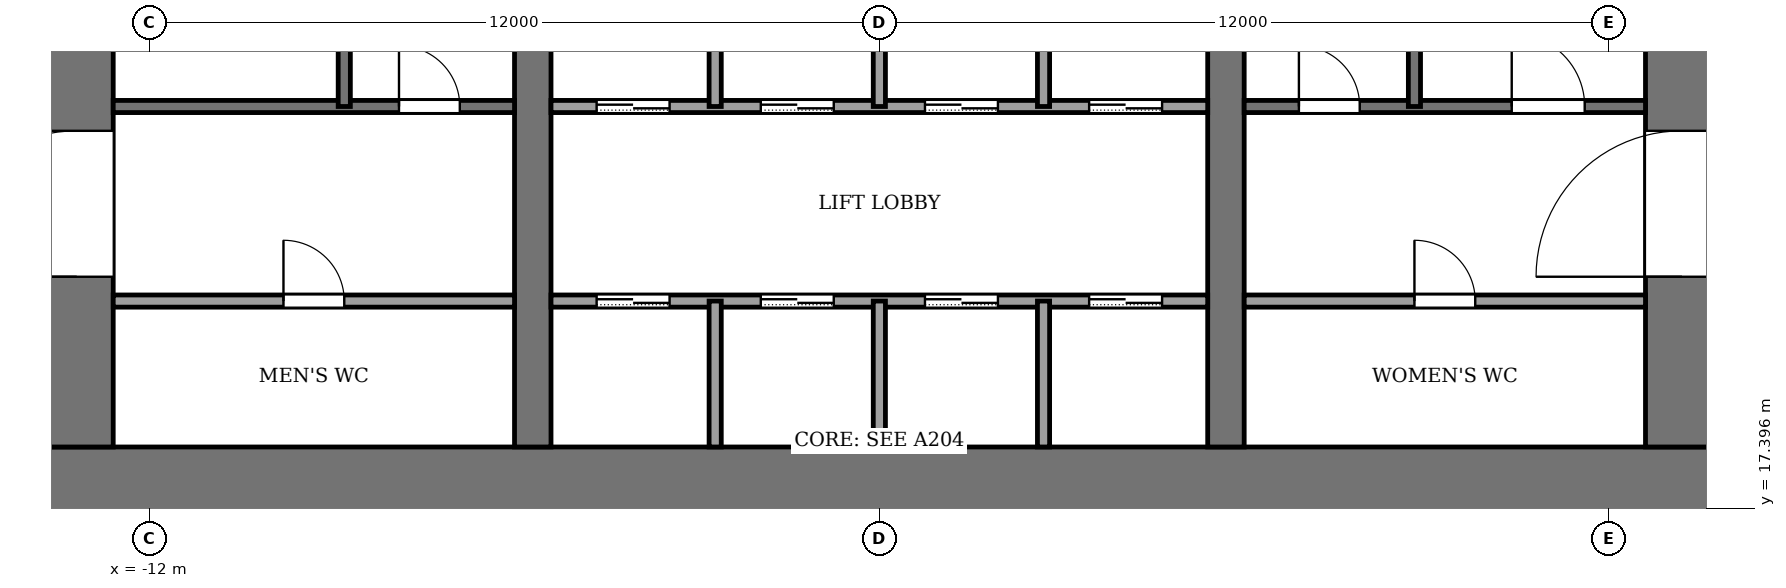
"""IFC4 building model, lengths in metres.
Left out: names, types, materials, properties, quantities, classifications, styles, units other than length and angle.
Written with IfcOpenShell. Run it as: python <this file> out.ifc"""

import sys

from ifc_helpers import new_model, si_unit, direction, frame, frame_2d, origin, place, context, subcontext, project, spatial, rectangle, extrude, element, fill, save


model = new_model("IFC4")
c1 = context("Model", 3, precision=1e-05, world=origin(), true_north=direction((0.0, 1.0)))
c2 = subcontext(c1, "Body", "Model", "MODEL_VIEW")
j1 = project(units=[si_unit("LENGTHUNIT", "METRE"), si_unit("PLANEANGLEUNIT", "RADIAN")], contexts=[c1])
p1 = place(None, origin())
s1 = spatial("IfcSite", under=j1, at=p1, CompositionType="ELEMENT")
p2 = place(p1, origin())
s2 = spatial("IfcBuilding", under=s1, at=p2, CompositionType="ELEMENT")
p3 = place(p2, frame((0.0, 0.0, 86.0)))
s3 = spatial("IfcBuildingStorey", under=s2, at=p3, CompositionType="ELEMENT", Elevation=86.0)
p4 = place(p3, frame((-13.8, 17.8, -0.13), z_axis=(0.0, 0.0, 1.0), x_axis=(1.0, 0.0, 0.0)))
e1 = element("IfcWall", 1, at=p4, inside=s3, PredefinedType="SHEAR", context=c2, shape_type="SweptSolid", body=[
    extrude(rectangle(XDim=27.6, YDim=1.2, at=frame_2d((13.8, 0.0))), origin(), (0.0, 0.0, 1.0), 4.0),
])
p5 = place(p3, frame((-13.2, 18.4, -0.13), z_axis=(0.0, 0.0, 1.0), x_axis=(0.0, 1.0, 0.0)))
e2 = element("IfcWall", 2, at=p5, inside=s3, PredefinedType="SHEAR", context=c2, shape_type="SweptSolid", body=[
    extrude(rectangle(XDim=19.2, YDim=1.2, at=frame_2d((9.6, 0.0))), origin(), (0.0, 0.0, 1.0), 4.0),
])
p6 = place(p5, frame((2.8, 0.0, 0.13)))
e3 = element("IfcOpeningElement", 3, at=p6, cuts=e2, PredefinedType="OPENING", context=c2, shape_type="SweptSolid", body=[
    extrude(rectangle(XDim=2.4, YDim=2.4, at=frame_2d((1.2, 1.2))), frame((0.0, 0.61, 0.0), z_axis=(0.0, -1.0, 0.0), x_axis=(1.0, 0.0, 0.0)), (0.0, 0.0, 1.0), 1.22),
])
p7 = place(p5, frame((13.4, 0.0, 0.13)))
e4 = element("IfcOpeningElement", 4, at=p7, cuts=e2, PredefinedType="OPENING", context=c2, shape_type="SweptSolid", body=[
    extrude(rectangle(XDim=1.4, YDim=2.2, at=frame_2d((0.7, 1.1))), frame((0.0, 0.61, 0.0), z_axis=(0.0, -1.0, 0.0), x_axis=(1.0, 0.0, 0.0)), (0.0, 0.0, 1.0), 1.22),
])
p8 = place(p3, frame((13.2, 18.4, -0.13), z_axis=(0.0, 0.0, 1.0), x_axis=(0.0, 1.0, 0.0)))
e5 = element("IfcWall", 5, at=p8, inside=s3, PredefinedType="SHEAR", context=c2, shape_type="SweptSolid", body=[
    extrude(rectangle(XDim=19.2, YDim=1.2, at=frame_2d((9.6, 0.0))), origin(), (0.0, 0.0, 1.0), 4.0),
])
p9 = place(p8, frame((2.8, 0.0, 0.13)))
e6 = element("IfcOpeningElement", 6, at=p9, cuts=e5, PredefinedType="OPENING", context=c2, shape_type="SweptSolid", body=[
    extrude(rectangle(XDim=2.4, YDim=2.4, at=frame_2d((1.2, 1.2))), frame((0.0, 0.61, 0.0), z_axis=(0.0, -1.0, 0.0), x_axis=(1.0, 0.0, 0.0)), (0.0, 0.0, 1.0), 1.22),
])
p10 = place(p8, frame((13.3, 0.0, 0.13)))
e7 = element("IfcOpeningElement", 7, at=p10, cuts=e5, PredefinedType="OPENING", context=c2, shape_type="SweptSolid", body=[
    extrude(rectangle(XDim=2.4, YDim=2.4, at=frame_2d((1.2, 1.2))), frame((0.0, 0.61, 0.0), z_axis=(0.0, -1.0, 0.0), x_axis=(1.0, 0.0, 0.0)), (0.0, 0.0, 1.0), 1.22),
])
p11 = place(p3, frame((-5.7, 18.4, -0.13), z_axis=(0.0, 0.0, 1.0), x_axis=(0.0, 1.0, 0.0)))
e8 = element("IfcWall", 8, at=p11, inside=s3, PredefinedType="SHEAR", context=c2, shape_type="SweptSolid", body=[
    extrude(rectangle(XDim=19.2, YDim=0.6, at=frame_2d((9.6, 0.0))), origin(), (0.0, 0.0, 1.0), 4.0),
])
p12 = place(p11, frame((8.35, 0.0, 0.13)))
e9 = element("IfcOpeningElement", 9, at=p12, cuts=e8, PredefinedType="OPENING", context=c2, shape_type="SweptSolid", body=[
    extrude(rectangle(XDim=0.9, YDim=2.1, at=frame_2d((0.45, 1.05))), frame((0.0, 0.31, 0.0), z_axis=(0.0, -1.0, 0.0), x_axis=(1.0, 0.0, 0.0)), (0.0, 0.0, 1.0), 0.62),
])
p13 = place(p3, frame((5.7, 18.4, -0.13), z_axis=(0.0, 0.0, 1.0), x_axis=(0.0, 1.0, 0.0)))
e10 = element("IfcWall", 10, at=p13, inside=s3, PredefinedType="SHEAR", context=c2, shape_type="SweptSolid", body=[
    extrude(rectangle(XDim=19.2, YDim=0.6, at=frame_2d((9.6, 0.0))), origin(), (0.0, 0.0, 1.0), 4.0),
])
p14 = place(p13, frame((13.3, 0.0, 0.13)))
e11 = element("IfcOpeningElement", 11, at=p14, cuts=e10, PredefinedType="OPENING", context=c2, shape_type="SweptSolid", body=[
    extrude(rectangle(XDim=2.4, YDim=2.4, at=frame_2d((1.2, 1.2))), frame((0.0, 0.31, 0.0), z_axis=(0.0, -1.0, 0.0), x_axis=(1.0, 0.0, 0.0)), (0.0, 0.0, 1.0), 0.62),
])
p15 = place(p3, frame((-12.6, 20.8, 0.0), z_axis=(0.0, 0.0, 1.0), x_axis=(1.0, 0.0, 0.0)))
e12 = element("IfcWall", 12, at=p15, inside=s3, PredefinedType="PARTITIONING", context=c2, shape_type="SweptSolid", body=[
    extrude(rectangle(XDim=6.6, YDim=0.2, at=frame_2d((3.3, 0.0))), origin(), (0.0, 0.0, 1.0), 3.87),
])
p16 = place(p15, frame((2.8, 0.0, 0.0)))
e13 = element("IfcOpeningElement", 13, at=p16, cuts=e12, PredefinedType="OPENING", context=c2, shape_type="SweptSolid", body=[
    extrude(rectangle(XDim=1.0, YDim=2.1, at=frame_2d((0.5, 1.05))), frame((0.0, 0.11, 0.0), z_axis=(0.0, -1.0, 0.0), x_axis=(1.0, 0.0, 0.0)), (0.0, 0.0, 1.0), 0.22),
])
p17 = place(p3, frame((-5.4, 20.8, 0.0), z_axis=(0.0, 0.0, 1.0), x_axis=(1.0, 0.0, 0.0)))
e14 = element("IfcWall", 14, at=p17, inside=s3, PredefinedType="PARTITIONING", context=c2, shape_type="SweptSolid", body=[
    extrude(rectangle(XDim=10.8, YDim=0.2, at=frame_2d((5.4, 0.0))), origin(), (0.0, 0.0, 1.0), 3.87),
])
p18 = place(p17, frame((0.75, 0.0, 0.0)))
e15 = element("IfcOpeningElement", 15, at=p18, cuts=e14, PredefinedType="OPENING", context=c2, shape_type="SweptSolid", body=[
    extrude(rectangle(XDim=1.2, YDim=2.2, at=frame_2d((0.6, 1.1))), frame((0.0, 0.11, 0.0), z_axis=(0.0, -1.0, 0.0), x_axis=(1.0, 0.0, 0.0)), (0.0, 0.0, 1.0), 0.22),
])
p19 = place(p17, frame((3.45, 0.0, 0.0)))
e16 = element("IfcOpeningElement", 16, at=p19, cuts=e14, PredefinedType="OPENING", context=c2, shape_type="SweptSolid", body=[
    extrude(rectangle(XDim=1.2, YDim=2.2, at=frame_2d((0.6, 1.1))), frame((0.0, 0.11, 0.0), z_axis=(0.0, -1.0, 0.0), x_axis=(1.0, 0.0, 0.0)), (0.0, 0.0, 1.0), 0.22),
])
p20 = place(p17, frame((6.15, 0.0, 0.0)))
e17 = element("IfcOpeningElement", 17, at=p20, cuts=e14, PredefinedType="OPENING", context=c2, shape_type="SweptSolid", body=[
    extrude(rectangle(XDim=1.2, YDim=2.2, at=frame_2d((0.6, 1.1))), frame((0.0, 0.11, 0.0), z_axis=(0.0, -1.0, 0.0), x_axis=(1.0, 0.0, 0.0)), (0.0, 0.0, 1.0), 0.22),
])
p21 = place(p17, frame((8.85, 0.0, 0.0)))
e18 = element("IfcOpeningElement", 18, at=p21, cuts=e14, PredefinedType="OPENING", context=c2, shape_type="SweptSolid", body=[
    extrude(rectangle(XDim=1.2, YDim=2.2, at=frame_2d((0.6, 1.1))), frame((0.0, 0.11, 0.0), z_axis=(0.0, -1.0, 0.0), x_axis=(1.0, 0.0, 0.0)), (0.0, 0.0, 1.0), 0.22),
])
p22 = place(p3, frame((6.0, 20.8, 0.0), z_axis=(0.0, 0.0, 1.0), x_axis=(1.0, 0.0, 0.0)))
e19 = element("IfcWall", 19, at=p22, inside=s3, PredefinedType="PARTITIONING", context=c2, shape_type="SweptSolid", body=[
    extrude(rectangle(XDim=6.6, YDim=0.2, at=frame_2d((3.3, 0.0))), origin(), (0.0, 0.0, 1.0), 3.87),
])
p23 = place(p22, frame((2.8, 0.0, 0.0)))
e20 = element("IfcOpeningElement", 20, at=p23, cuts=e19, PredefinedType="OPENING", context=c2, shape_type="SweptSolid", body=[
    extrude(rectangle(XDim=1.0, YDim=2.1, at=frame_2d((0.5, 1.05))), frame((0.0, 0.11, 0.0), z_axis=(0.0, -1.0, 0.0), x_axis=(1.0, 0.0, 0.0)), (0.0, 0.0, 1.0), 0.22),
])
p24 = place(p3, frame((-12.6, 24.0, 0.0), z_axis=(0.0, 0.0, 1.0), x_axis=(1.0, 0.0, 0.0)))
e21 = element("IfcWall", 21, at=p24, inside=s3, PredefinedType="PARTITIONING", context=c2, shape_type="SweptSolid", body=[
    extrude(rectangle(XDim=6.6, YDim=0.2, at=frame_2d((3.3, 0.0))), origin(), (0.0, 0.0, 1.0), 3.87),
])
p25 = place(p24, frame((4.7, 0.0, 0.0)))
e22 = element("IfcOpeningElement", 22, at=p25, cuts=e21, PredefinedType="OPENING", context=c2, shape_type="SweptSolid", body=[
    extrude(rectangle(XDim=1.0, YDim=2.1, at=frame_2d((0.5, 1.05))), frame((0.0, 0.11, 0.0), z_axis=(0.0, -1.0, 0.0), x_axis=(1.0, 0.0, 0.0)), (0.0, 0.0, 1.0), 0.22),
])
p26 = place(p3, frame((-5.4, 24.0, 0.0), z_axis=(0.0, 0.0, 1.0), x_axis=(1.0, 0.0, 0.0)))
e23 = element("IfcWall", 23, at=p26, inside=s3, PredefinedType="PARTITIONING", context=c2, shape_type="SweptSolid", body=[
    extrude(rectangle(XDim=10.8, YDim=0.2, at=frame_2d((5.4, 0.0))), origin(), (0.0, 0.0, 1.0), 3.87),
])
p27 = place(p26, frame((0.75, 0.0, 0.0)))
e24 = element("IfcOpeningElement", 24, at=p27, cuts=e23, PredefinedType="OPENING", context=c2, shape_type="SweptSolid", body=[
    extrude(rectangle(XDim=1.2, YDim=2.2, at=frame_2d((0.6, 1.1))), frame((0.0, 0.11, 0.0), z_axis=(0.0, -1.0, 0.0), x_axis=(1.0, 0.0, 0.0)), (0.0, 0.0, 1.0), 0.22),
])
p28 = place(p26, frame((3.45, 0.0, 0.0)))
e25 = element("IfcOpeningElement", 25, at=p28, cuts=e23, PredefinedType="OPENING", context=c2, shape_type="SweptSolid", body=[
    extrude(rectangle(XDim=1.2, YDim=2.2, at=frame_2d((0.6, 1.1))), frame((0.0, 0.11, 0.0), z_axis=(0.0, -1.0, 0.0), x_axis=(1.0, 0.0, 0.0)), (0.0, 0.0, 1.0), 0.22),
])
p29 = place(p26, frame((6.15, 0.0, 0.0)))
e26 = element("IfcOpeningElement", 26, at=p29, cuts=e23, PredefinedType="OPENING", context=c2, shape_type="SweptSolid", body=[
    extrude(rectangle(XDim=1.2, YDim=2.2, at=frame_2d((0.6, 1.1))), frame((0.0, 0.11, 0.0), z_axis=(0.0, -1.0, 0.0), x_axis=(1.0, 0.0, 0.0)), (0.0, 0.0, 1.0), 0.22),
])
p30 = place(p26, frame((8.85, 0.0, 0.0)))
e27 = element("IfcOpeningElement", 27, at=p30, cuts=e23, PredefinedType="OPENING", context=c2, shape_type="SweptSolid", body=[
    extrude(rectangle(XDim=1.2, YDim=2.2, at=frame_2d((0.6, 1.1))), frame((0.0, 0.11, 0.0), z_axis=(0.0, -1.0, 0.0), x_axis=(1.0, 0.0, 0.0)), (0.0, 0.0, 1.0), 0.22),
])
p31 = place(p3, frame((6.0, 24.0, 0.0), z_axis=(0.0, 0.0, 1.0), x_axis=(1.0, 0.0, 0.0)))
e28 = element("IfcWall", 28, at=p31, inside=s3, PredefinedType="PARTITIONING", context=c2, shape_type="SweptSolid", body=[
    extrude(rectangle(XDim=6.6, YDim=0.2, at=frame_2d((3.3, 0.0))), origin(), (0.0, 0.0, 1.0), 3.87),
])
p32 = place(p31, frame((0.9, 0.0, 0.0)))
e29 = element("IfcOpeningElement", 29, at=p32, cuts=e28, PredefinedType="OPENING", context=c2, shape_type="SweptSolid", body=[
    extrude(rectangle(XDim=1.0, YDim=2.1, at=frame_2d((0.5, 1.05))), frame((0.0, 0.11, 0.0), z_axis=(0.0, -1.0, 0.0), x_axis=(1.0, 0.0, 0.0)), (0.0, 0.0, 1.0), 0.22),
])
p33 = place(p31, frame((4.4, 0.0, 0.0)))
e30 = element("IfcOpeningElement", 30, at=p33, cuts=e28, PredefinedType="OPENING", context=c2, shape_type="SweptSolid", body=[
    extrude(rectangle(XDim=1.2, YDim=2.2, at=frame_2d((0.6, 1.1))), frame((0.0, 0.11, 0.0), z_axis=(0.0, -1.0, 0.0), x_axis=(1.0, 0.0, 0.0)), (0.0, 0.0, 1.0), 0.22),
])
p34 = place(p3, frame((-8.8, 24.0, 0.0), z_axis=(0.0, 0.0, 1.0), x_axis=(0.0, 1.0, 0.0)))
e31 = element("IfcWall", 31, at=p34, inside=s3, PredefinedType="PARTITIONING", context=c2, shape_type="SweptSolid", body=[
    extrude(rectangle(XDim=7.4, YDim=0.2, at=frame_2d((3.7, 0.0))), origin(), (0.0, 0.0, 1.0), 3.87),
])
p35 = place(p3, frame((-2.7, 18.4, 0.0), z_axis=(0.0, 0.0, 1.0), x_axis=(0.0, 1.0, 0.0)))
e32 = element("IfcWall", 32, at=p35, inside=s3, PredefinedType="PARTITIONING", context=c2, shape_type="SweptSolid", body=[
    extrude(rectangle(XDim=2.4, YDim=0.2, at=frame_2d((1.2, 0.0))), origin(), (0.0, 0.0, 1.0), 3.87),
])
p36 = place(p3, frame((-2.7, 24.0, 0.0), z_axis=(0.0, 0.0, 1.0), x_axis=(0.0, 1.0, 0.0)))
e33 = element("IfcWall", 33, at=p36, inside=s3, PredefinedType="PARTITIONING", context=c2, shape_type="SweptSolid", body=[
    extrude(rectangle(XDim=2.4, YDim=0.2, at=frame_2d((1.2, 0.0))), origin(), (0.0, 0.0, 1.0), 3.87),
])
p37 = place(p3, frame((0.0, 18.4, 0.0), z_axis=(0.0, 0.0, 1.0), x_axis=(0.0, 1.0, 0.0)))
e34 = element("IfcWall", 34, at=p37, inside=s3, PredefinedType="PARTITIONING", context=c2, shape_type="SweptSolid", body=[
    extrude(rectangle(XDim=2.4, YDim=0.2, at=frame_2d((1.2, 0.0))), origin(), (0.0, 0.0, 1.0), 3.87),
])
p38 = place(p3, frame((0.0, 24.0, 0.0), z_axis=(0.0, 0.0, 1.0), x_axis=(0.0, 1.0, 0.0)))
e35 = element("IfcWall", 35, at=p38, inside=s3, PredefinedType="PARTITIONING", context=c2, shape_type="SweptSolid", body=[
    extrude(rectangle(XDim=2.4, YDim=0.2, at=frame_2d((1.2, 0.0))), origin(), (0.0, 0.0, 1.0), 3.87),
])
p39 = place(p3, frame((2.7, 18.4, 0.0), z_axis=(0.0, 0.0, 1.0), x_axis=(0.0, 1.0, 0.0)))
e36 = element("IfcWall", 36, at=p39, inside=s3, PredefinedType="PARTITIONING", context=c2, shape_type="SweptSolid", body=[
    extrude(rectangle(XDim=2.4, YDim=0.2, at=frame_2d((1.2, 0.0))), origin(), (0.0, 0.0, 1.0), 3.87),
])
p40 = place(p3, frame((2.7, 24.0, 0.0), z_axis=(0.0, 0.0, 1.0), x_axis=(0.0, 1.0, 0.0)))
e37 = element("IfcWall", 37, at=p40, inside=s3, PredefinedType="PARTITIONING", context=c2, shape_type="SweptSolid", body=[
    extrude(rectangle(XDim=2.4, YDim=0.2, at=frame_2d((1.2, 0.0))), origin(), (0.0, 0.0, 1.0), 3.87),
])
p41 = place(p3, frame((8.8, 24.0, 0.0), z_axis=(0.0, 0.0, 1.0), x_axis=(0.0, 1.0, 0.0)))
e38 = element("IfcWall", 38, at=p41, inside=s3, PredefinedType="PARTITIONING", context=c2, shape_type="SweptSolid", body=[
    extrude(rectangle(XDim=7.4, YDim=0.2, at=frame_2d((3.7, 0.0))), origin(), (0.0, 0.0, 1.0), 3.87),
])
p42 = place(p18, origin())
e39 = element("IfcDoor", 39, at=p42, inside=s3, OperationType="SLIDING_TO_LEFT", PredefinedType="DOOR", context=c2, shape_type="SweptSolid", body=[
    extrude(rectangle(XDim=1.2, YDim=2.2, at=frame_2d((0.6, 1.1))), frame((0.0, 0.025, 0.0), z_axis=(0.0, -1.0, 0.0), x_axis=(1.0, 0.0, 0.0)), (0.0, 0.0, 1.0), 0.05),
])
fill(e15, e39)
p43 = place(p19, origin())
e40 = element("IfcDoor", 40, at=p43, inside=s3, OperationType="SLIDING_TO_LEFT", PredefinedType="DOOR", context=c2, shape_type="SweptSolid", body=[
    extrude(rectangle(XDim=1.2, YDim=2.2, at=frame_2d((0.6, 1.1))), frame((0.0, 0.025, 0.0), z_axis=(0.0, -1.0, 0.0), x_axis=(1.0, 0.0, 0.0)), (0.0, 0.0, 1.0), 0.05),
])
fill(e16, e40)
p44 = place(p20, origin())
e41 = element("IfcDoor", 41, at=p44, inside=s3, OperationType="SLIDING_TO_LEFT", PredefinedType="DOOR", context=c2, shape_type="SweptSolid", body=[
    extrude(rectangle(XDim=1.2, YDim=2.2, at=frame_2d((0.6, 1.1))), frame((0.0, 0.025, 0.0), z_axis=(0.0, -1.0, 0.0), x_axis=(1.0, 0.0, 0.0)), (0.0, 0.0, 1.0), 0.05),
])
fill(e17, e41)
p45 = place(p21, origin())
e42 = element("IfcDoor", 42, at=p45, inside=s3, OperationType="SLIDING_TO_LEFT", PredefinedType="DOOR", context=c2, shape_type="SweptSolid", body=[
    extrude(rectangle(XDim=1.2, YDim=2.2, at=frame_2d((0.6, 1.1))), frame((0.0, 0.025, 0.0), z_axis=(0.0, -1.0, 0.0), x_axis=(1.0, 0.0, 0.0)), (0.0, 0.0, 1.0), 0.05),
])
fill(e18, e42)
p46 = place(p27, origin())
e43 = element("IfcDoor", 43, at=p46, inside=s3, OperationType="SLIDING_TO_LEFT", PredefinedType="DOOR", context=c2, shape_type="SweptSolid", body=[
    extrude(rectangle(XDim=1.2, YDim=2.2, at=frame_2d((0.6, 1.1))), frame((0.0, 0.025, 0.0), z_axis=(0.0, -1.0, 0.0), x_axis=(1.0, 0.0, 0.0)), (0.0, 0.0, 1.0), 0.05),
])
fill(e24, e43)
p47 = place(p28, origin())
e44 = element("IfcDoor", 44, at=p47, inside=s3, OperationType="SLIDING_TO_LEFT", PredefinedType="DOOR", context=c2, shape_type="SweptSolid", body=[
    extrude(rectangle(XDim=1.2, YDim=2.2, at=frame_2d((0.6, 1.1))), frame((0.0, 0.025, 0.0), z_axis=(0.0, -1.0, 0.0), x_axis=(1.0, 0.0, 0.0)), (0.0, 0.0, 1.0), 0.05),
])
fill(e25, e44)
p48 = place(p29, origin())
e45 = element("IfcDoor", 45, at=p48, inside=s3, OperationType="SLIDING_TO_LEFT", PredefinedType="DOOR", context=c2, shape_type="SweptSolid", body=[
    extrude(rectangle(XDim=1.2, YDim=2.2, at=frame_2d((0.6, 1.1))), frame((0.0, 0.025, 0.0), z_axis=(0.0, -1.0, 0.0), x_axis=(1.0, 0.0, 0.0)), (0.0, 0.0, 1.0), 0.05),
])
fill(e26, e45)
p49 = place(p30, origin())
e46 = element("IfcDoor", 46, at=p49, inside=s3, OperationType="SLIDING_TO_LEFT", PredefinedType="DOOR", context=c2, shape_type="SweptSolid", body=[
    extrude(rectangle(XDim=1.2, YDim=2.2, at=frame_2d((0.6, 1.1))), frame((0.0, 0.025, 0.0), z_axis=(0.0, -1.0, 0.0), x_axis=(1.0, 0.0, 0.0)), (0.0, 0.0, 1.0), 0.05),
])
fill(e27, e46)
p50 = place(p16, origin())
e47 = element("IfcDoor", 47, at=p50, inside=s3, OperationType="SINGLE_SWING_LEFT", PredefinedType="DOOR", context=c2, shape_type="SweptSolid", body=[
    extrude(rectangle(XDim=1.0, YDim=2.1, at=frame_2d((0.5, 1.05))), frame((0.0, 0.025, 0.0), z_axis=(0.0, -1.0, 0.0), x_axis=(1.0, 0.0, 0.0)), (0.0, 0.0, 1.0), 0.05),
])
fill(e13, e47)
p51 = place(p23, origin())
e48 = element("IfcDoor", 48, at=p51, inside=s3, OperationType="SINGLE_SWING_RIGHT", PredefinedType="DOOR", context=c2, shape_type="SweptSolid", body=[
    extrude(rectangle(XDim=1.0, YDim=2.1, at=frame_2d((0.5, 1.05))), frame((0.0, 0.025, 0.0), z_axis=(0.0, -1.0, 0.0), x_axis=(1.0, 0.0, 0.0)), (0.0, 0.0, 1.0), 0.05),
])
fill(e20, e48)
p52 = place(p25, origin())
e49 = element("IfcDoor", 49, at=p52, inside=s3, OperationType="SINGLE_SWING_RIGHT", PredefinedType="DOOR", context=c2, shape_type="SweptSolid", body=[
    extrude(rectangle(XDim=1.0, YDim=2.1, at=frame_2d((0.5, 1.05))), frame((0.0, 0.025, 0.0), z_axis=(0.0, -1.0, 0.0), x_axis=(1.0, 0.0, 0.0)), (0.0, 0.0, 1.0), 0.05),
])
fill(e22, e49)
p53 = place(p32, origin())
e50 = element("IfcDoor", 50, at=p53, inside=s3, OperationType="SINGLE_SWING_LEFT", PredefinedType="DOOR", context=c2, shape_type="SweptSolid", body=[
    extrude(rectangle(XDim=1.0, YDim=2.1, at=frame_2d((0.5, 1.05))), frame((0.0, 0.025, 0.0), z_axis=(0.0, -1.0, 0.0), x_axis=(1.0, 0.0, 0.0)), (0.0, 0.0, 1.0), 0.05),
])
fill(e29, e50)
p54 = place(p33, origin())
e51 = element("IfcDoor", 51, at=p54, inside=s3, OperationType="SINGLE_SWING_LEFT", PredefinedType="DOOR", context=c2, shape_type="SweptSolid", body=[
    extrude(rectangle(XDim=1.2, YDim=2.2, at=frame_2d((0.6, 1.1))), frame((0.0, 0.025, 0.0), z_axis=(0.0, -1.0, 0.0), x_axis=(1.0, 0.0, 0.0)), (0.0, 0.0, 1.0), 0.05),
])
fill(e30, e51)
p55 = place(p6, origin())
e52 = element("IfcDoor", 52, at=p55, inside=s3, OperationType="DOUBLE_DOOR_SINGLE_SWING", PredefinedType="DOOR", context=c2, shape_type="SweptSolid", body=[
    extrude(rectangle(XDim=2.4, YDim=2.4, at=frame_2d((1.2, 1.2))), frame((0.0, 0.025, 0.0), z_axis=(0.0, -1.0, 0.0), x_axis=(1.0, 0.0, 0.0)), (0.0, 0.0, 1.0), 0.05),
])
fill(e3, e52)
p56 = place(p9, origin())
e53 = element("IfcDoor", 53, at=p56, inside=s3, OperationType="DOUBLE_DOOR_SINGLE_SWING", PredefinedType="DOOR", context=c2, shape_type="SweptSolid", body=[
    extrude(rectangle(XDim=2.4, YDim=2.4, at=frame_2d((1.2, 1.2))), frame((0.0, 0.025, 0.0), z_axis=(0.0, -1.0, 0.0), x_axis=(1.0, 0.0, 0.0)), (0.0, 0.0, 1.0), 0.05),
])
fill(e6, e53)
save(model, sys.argv[1])
